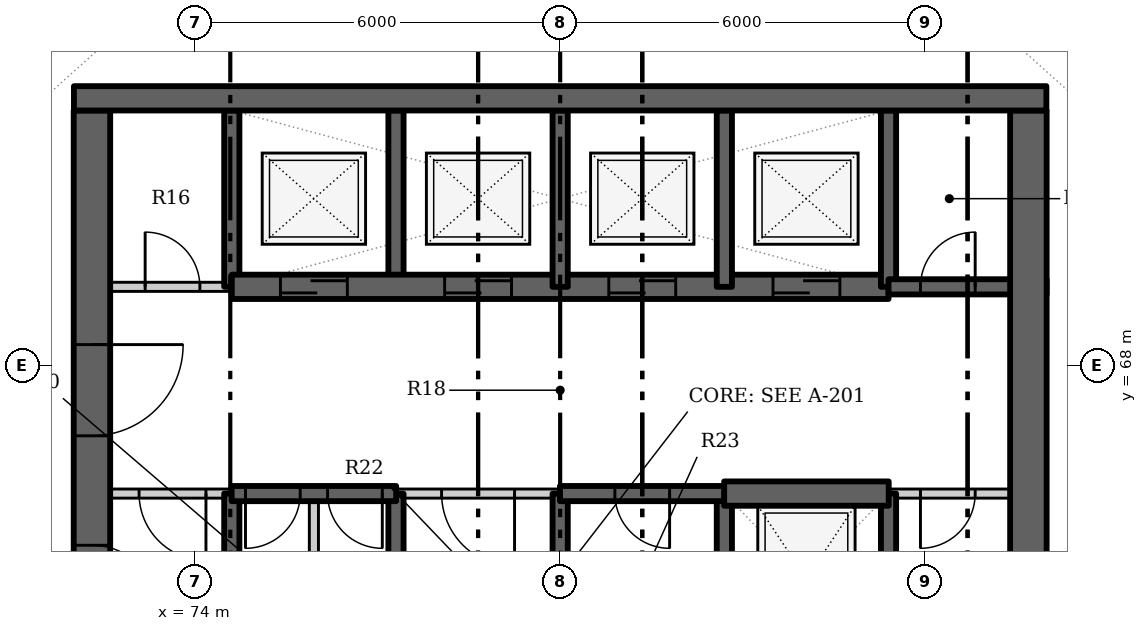
"""IFC4 building model, lengths in metres.
Left out: names, types, materials, properties, quantities, classifications, styles, units other than length and angle.
Written with IfcOpenShell. Run it as: python <this file> out.ifc"""

import sys

from ifc_helpers import new_model, si_unit, direction, frame, frame_2d, origin, place, context, subcontext, project, spatial, rectangle, extrude, element, fill, save


model = new_model("IFC4")
c1 = context("Model", 3, precision=1e-05, world=origin(), true_north=direction((0.0, 1.0)))
c2 = subcontext(c1, "Body", "Model", "MODEL_VIEW")
j1 = project(units=[si_unit("LENGTHUNIT", "METRE"), si_unit("PLANEANGLEUNIT", "RADIAN")], contexts=[c1])
p1 = place(None, origin())
s1 = spatial("IfcSite", under=j1, at=p1, CompositionType="ELEMENT")
p2 = place(p1, origin())
s2 = spatial("IfcBuilding", under=s1, at=p2, CompositionType="ELEMENT")
p3 = place(p2, origin())
s3 = spatial("IfcBuildingStorey", under=s2, at=p3, CompositionType="ELEMENT", Elevation=0.0)
p4 = place(p3, frame((74.6, 63.1, -1.8), z_axis=(0.0, 0.0, 1.0), x_axis=(0.0, 1.0, 0.0)))
e1 = element("IfcWall", 1, at=p4, inside=s3, PredefinedType="SHEAR", context=c2, shape_type="SweptSolid", body=[
    extrude(rectangle(XDim=2.8, YDim=0.25, at=frame_2d((1.4, 0.0))), origin(), (0.0, 0.0, 1.0), 8.1),
])
p5 = place(p3, frame((74.6, 69.3, -1.8), z_axis=(0.0, 0.0, 1.0), x_axis=(0.0, 1.0, 0.0)))
e2 = element("IfcWall", 2, at=p5, inside=s3, PredefinedType="SHEAR", context=c2, shape_type="SweptSolid", body=[
    extrude(rectangle(XDim=2.9, YDim=0.25, at=frame_2d((1.45, 0.0))), origin(), (0.0, 0.0, 1.0), 8.1),
])
p6 = place(p3, frame((72.0, 69.3, 0.0), z_axis=(0.0, 0.0, 1.0), x_axis=(1.0, 0.0, 0.0)))
e3 = element("IfcWall", 3, at=p6, inside=s3, PredefinedType="PARTITIONING", context=c2, shape_type="SweptSolid", body=[
    extrude(rectangle(XDim=2.6, YDim=0.15, at=frame_2d((1.3, 0.0))), origin(), (0.0, 0.0, 1.0), 6.3),
])
p7 = place(p6, frame((1.175, 0.0, 0.0)))
e4 = element("IfcOpeningElement", 4, at=p7, cuts=e3, PredefinedType="OPENING", context=c2, shape_type="SweptSolid", body=[
    extrude(rectangle(XDim=0.9, YDim=2.1, at=frame_2d((0.45, 1.05))), frame((0.0, 0.085, 0.0), z_axis=(0.0, -1.0, 0.0), x_axis=(1.0, 0.0, 0.0)), (0.0, 0.0, 1.0), 0.17),
])
p8 = place(p3, frame((72.3, 72.2, -1.8), z_axis=(0.0, 0.0, 1.0), x_axis=(0.0, -1.0, 0.0)))
e5 = element("IfcWall", 5, at=p8, inside=s3, PredefinedType="SHEAR", context=c2, shape_type="SweptSolid", body=[
    extrude(rectangle(XDim=9.1, YDim=0.6, at=frame_2d((4.55, 0.0))), origin(), (0.0, 0.0, 1.0), 8.1),
])
p9 = place(p8, frame((7.15, 0.0, 1.8)))
e6 = element("IfcOpeningElement", 6, at=p9, cuts=e5, PredefinedType="OPENING", context=c2, shape_type="SweptSolid", body=[
    extrude(rectangle(XDim=1.1, YDim=2.1, at=frame_2d((0.55, 1.05))), frame((0.0, 0.31, 0.0), z_axis=(0.0, -1.0, 0.0), x_axis=(1.0, 0.0, 0.0)), (0.0, 0.0, 1.0), 0.62),
])
p10 = place(p8, frame((3.85, 0.0, 1.8)))
e7 = element("IfcOpeningElement", 7, at=p10, cuts=e5, PredefinedType="OPENING", context=c2, shape_type="SweptSolid", body=[
    extrude(rectangle(XDim=1.5, YDim=2.1, at=frame_2d((0.75, 1.05))), frame((0.0, 0.31, 0.0), z_axis=(0.0, -1.0, 0.0), x_axis=(1.0, 0.0, 0.0)), (0.0, 0.0, 1.0), 0.62),
])
p11 = place(p3, frame((77.3, 63.1, -1.8), z_axis=(0.0, 0.0, 1.0), x_axis=(0.0, 1.0, 0.0)))
e8 = element("IfcWall", 8, at=p11, inside=s3, PredefinedType="SHEAR", context=c2, shape_type="SweptSolid", body=[
    extrude(rectangle(XDim=2.8, YDim=0.25, at=frame_2d((1.4, 0.0))), origin(), (0.0, 0.0, 1.0), 8.1),
])
p12 = place(p3, frame((77.3, 69.3, -1.8), z_axis=(0.0, 0.0, 1.0), x_axis=(0.0, 1.0, 0.0)))
e9 = element("IfcWall", 9, at=p12, inside=s3, PredefinedType="SHEAR", context=c2, shape_type="SweptSolid", body=[
    extrude(rectangle(XDim=2.9, YDim=0.25, at=frame_2d((1.45, 0.0))), origin(), (0.0, 0.0, 1.0), 8.1),
])
p13 = place(p3, frame((74.6, 69.3, -1.8), z_axis=(0.0, 0.0, 1.0), x_axis=(1.0, 0.0, 0.0)))
e10 = element("IfcWall", 10, at=p13, inside=s3, PredefinedType="SHEAR", context=c2, shape_type="SweptSolid", body=[
    extrude(rectangle(XDim=10.8, YDim=0.4, at=frame_2d((5.4, 0.0))), origin(), (0.0, 0.0, 1.0), 8.1),
])
p14 = place(p13, frame((0.8, 0.0, 1.8)))
e11 = element("IfcOpeningElement", 11, at=p14, cuts=e10, PredefinedType="OPENING", context=c2, shape_type="SweptSolid", body=[
    extrude(rectangle(XDim=1.1, YDim=2.1, at=frame_2d((0.55, 1.05))), frame((0.0, 0.21, 0.0), z_axis=(0.0, -1.0, 0.0), x_axis=(1.0, 0.0, 0.0)), (0.0, 0.0, 1.0), 0.42),
])
p15 = place(p13, frame((3.5, 0.0, 1.8)))
e12 = element("IfcOpeningElement", 12, at=p15, cuts=e10, PredefinedType="OPENING", context=c2, shape_type="SweptSolid", body=[
    extrude(rectangle(XDim=1.1, YDim=2.1, at=frame_2d((0.55, 1.05))), frame((0.0, 0.21, 0.0), z_axis=(0.0, -1.0, 0.0), x_axis=(1.0, 0.0, 0.0)), (0.0, 0.0, 1.0), 0.42),
])
p16 = place(p13, frame((6.2, 0.0, 1.8)))
e13 = element("IfcOpeningElement", 13, at=p16, cuts=e10, PredefinedType="OPENING", context=c2, shape_type="SweptSolid", body=[
    extrude(rectangle(XDim=1.1, YDim=2.1, at=frame_2d((0.55, 1.05))), frame((0.0, 0.21, 0.0), z_axis=(0.0, -1.0, 0.0), x_axis=(1.0, 0.0, 0.0)), (0.0, 0.0, 1.0), 0.42),
])
p17 = place(p13, frame((8.9, 0.0, 1.8)))
e14 = element("IfcOpeningElement", 14, at=p17, cuts=e10, PredefinedType="OPENING", context=c2, shape_type="SweptSolid", body=[
    extrude(rectangle(XDim=1.1, YDim=2.1, at=frame_2d((0.55, 1.05))), frame((0.0, 0.21, 0.0), z_axis=(0.0, -1.0, 0.0), x_axis=(1.0, 0.0, 0.0)), (0.0, 0.0, 1.0), 0.42),
])
p18 = place(p3, frame((80.0, 63.1, -1.8), z_axis=(0.0, 0.0, 1.0), x_axis=(0.0, 1.0, 0.0)))
e15 = element("IfcWall", 15, at=p18, inside=s3, PredefinedType="SHEAR", context=c2, shape_type="SweptSolid", body=[
    extrude(rectangle(XDim=2.8, YDim=0.25, at=frame_2d((1.4, 0.0))), origin(), (0.0, 0.0, 1.0), 8.1),
])
p19 = place(p3, frame((80.0, 69.3, -1.8), z_axis=(0.0, 0.0, 1.0), x_axis=(0.0, 1.0, 0.0)))
e16 = element("IfcWall", 16, at=p19, inside=s3, PredefinedType="SHEAR", context=c2, shape_type="SweptSolid", body=[
    extrude(rectangle(XDim=2.9, YDim=0.25, at=frame_2d((1.45, 0.0))), origin(), (0.0, 0.0, 1.0), 8.1),
])
p20 = place(p3, frame((82.7, 63.1, -1.8), z_axis=(0.0, 0.0, 1.0), x_axis=(0.0, 1.0, 0.0)))
e17 = element("IfcWall", 17, at=p20, inside=s3, PredefinedType="SHEAR", context=c2, shape_type="SweptSolid", body=[
    extrude(rectangle(XDim=2.8, YDim=0.25, at=frame_2d((1.4, 0.0))), origin(), (0.0, 0.0, 1.0), 8.1),
])
p21 = place(p3, frame((82.7, 69.3, -1.8), z_axis=(0.0, 0.0, 1.0), x_axis=(0.0, 1.0, 0.0)))
e18 = element("IfcWall", 18, at=p21, inside=s3, PredefinedType="SHEAR", context=c2, shape_type="SweptSolid", body=[
    extrude(rectangle(XDim=2.9, YDim=0.25, at=frame_2d((1.45, 0.0))), origin(), (0.0, 0.0, 1.0), 8.1),
])
p22 = place(p3, frame((85.4, 63.1, -1.8), z_axis=(0.0, 0.0, 1.0), x_axis=(0.0, 1.0, 0.0)))
e19 = element("IfcWall", 19, at=p22, inside=s3, PredefinedType="SHEAR", context=c2, shape_type="SweptSolid", body=[
    extrude(rectangle(XDim=2.8, YDim=0.25, at=frame_2d((1.4, 0.0))), origin(), (0.0, 0.0, 1.0), 8.1),
])
p23 = place(p3, frame((85.4, 69.3, -1.8), z_axis=(0.0, 0.0, 1.0), x_axis=(0.0, 1.0, 0.0)))
e20 = element("IfcWall", 20, at=p23, inside=s3, PredefinedType="SHEAR", context=c2, shape_type="SweptSolid", body=[
    extrude(rectangle(XDim=2.9, YDim=0.25, at=frame_2d((1.45, 0.0))), origin(), (0.0, 0.0, 1.0), 8.1),
])
p24 = place(p3, frame((85.4, 69.3, -1.8), z_axis=(0.0, 0.0, 1.0), x_axis=(1.0, 0.0, 0.0)))
e21 = element("IfcWall", 21, at=p24, inside=s3, PredefinedType="SHEAR", context=c2, shape_type="SweptSolid", body=[
    extrude(rectangle(XDim=2.6, YDim=0.25, at=frame_2d((1.3, 0.0))), origin(), (0.0, 0.0, 1.0), 8.1),
])
p25 = place(p24, frame((0.525, 0.0, 1.8)))
e22 = element("IfcOpeningElement", 22, at=p25, cuts=e21, PredefinedType="OPENING", context=c2, shape_type="SweptSolid", body=[
    extrude(rectangle(XDim=0.9, YDim=2.1, at=frame_2d((0.45, 1.05))), frame((0.0, 0.135, 0.0), z_axis=(0.0, -1.0, 0.0), x_axis=(1.0, 0.0, 0.0)), (0.0, 0.0, 1.0), 0.27),
])
p26 = place(p3, frame((87.7, 56.6, -1.8), z_axis=(0.0, 0.0, 1.0), x_axis=(0.0, 1.0, 0.0)))
e23 = element("IfcWall", 23, at=p26, inside=s3, PredefinedType="SHEAR", context=c2, shape_type="SweptSolid", body=[
    extrude(rectangle(XDim=15.6, YDim=0.6, at=frame_2d((7.8, 0.0))), origin(), (0.0, 0.0, 1.0), 8.1),
])
p27 = place(p26, frame((2.702, 0.0, 1.8)))
e24 = element("IfcOpeningElement", 24, at=p27, cuts=e23, PredefinedType="OPENING", context=c2, shape_type="SweptSolid", body=[
    extrude(rectangle(XDim=1.1, YDim=2.1, at=frame_2d((0.55, 1.05))), frame((0.0, 0.31, 0.0), z_axis=(0.0, -1.0, 0.0), x_axis=(1.0, 0.0, 0.0)), (0.0, 0.0, 1.0), 0.62),
])
p28 = place(p3, frame((74.603, 65.9, 0.0), z_axis=(0.0, 0.0, 1.0), x_axis=(-1.0, 0.0, 0.0)))
e25 = element("IfcWall", 25, at=p28, inside=s3, PredefinedType="PARTITIONING", context=c2, shape_type="SweptSolid", body=[
    extrude(rectangle(XDim=2.603, YDim=0.15, at=frame_2d((1.302, 0.0))), origin(), (0.0, 0.0, 1.0), 6.3),
])
p29 = place(p28, frame((0.428, 0.0, 0.0)))
e26 = element("IfcOpeningElement", 26, at=p29, cuts=e25, PredefinedType="OPENING", context=c2, shape_type="SweptSolid", body=[
    extrude(rectangle(XDim=1.1, YDim=2.1, at=frame_2d((0.55, 1.05))), frame((0.0, 0.085, 0.0), z_axis=(0.0, -1.0, 0.0), x_axis=(1.0, 0.0, 0.0)), (0.0, 0.0, 1.0), 0.17),
])
p30 = place(p3, frame((80.003, 65.9, 0.0), z_axis=(0.0, 0.0, 1.0), x_axis=(-1.0, 0.0, 0.0)))
e27 = element("IfcWall", 27, at=p30, inside=s3, PredefinedType="PARTITIONING", context=c2, shape_type="SweptSolid", body=[
    extrude(rectangle(XDim=2.706, YDim=0.15, at=frame_2d((1.353, 0.0))), origin(), (0.0, 0.0, 1.0), 6.3),
])
p31 = place(p30, frame((0.753, 0.0, 0.0)))
e28 = element("IfcOpeningElement", 28, at=p31, cuts=e27, PredefinedType="OPENING", context=c2, shape_type="SweptSolid", body=[
    extrude(rectangle(XDim=1.2, YDim=2.1, at=frame_2d((0.6, 1.05))), frame((0.0, 0.085, 0.0), z_axis=(0.0, -1.0, 0.0), x_axis=(1.0, 0.0, 0.0)), (0.0, 0.0, 1.0), 0.17),
])
p32 = place(p3, frame((88.0, 65.9, 0.0), z_axis=(0.0, 0.0, 1.0), x_axis=(-1.0, 0.0, 0.0)))
e29 = element("IfcWall", 29, at=p32, inside=s3, PredefinedType="PARTITIONING", context=c2, shape_type="SweptSolid", body=[
    extrude(rectangle(XDim=2.603, YDim=0.15, at=frame_2d((1.302, 0.0))), origin(), (0.0, 0.0, 1.0), 6.3),
])
p33 = place(p32, frame((1.175, 0.0, 0.0)))
e30 = element("IfcOpeningElement", 30, at=p33, cuts=e29, PredefinedType="OPENING", context=c2, shape_type="SweptSolid", body=[
    extrude(rectangle(XDim=0.9, YDim=2.1, at=frame_2d((0.45, 1.05))), frame((0.0, 0.085, 0.0), z_axis=(0.0, -1.0, 0.0), x_axis=(1.0, 0.0, 0.0)), (0.0, 0.0, 1.0), 0.17),
])
p34 = place(p3, frame((77.303, 65.9, -1.8), z_axis=(0.0, 0.0, 1.0), x_axis=(-1.0, 0.0, 0.0)))
e31 = element("IfcWall", 31, at=p34, inside=s3, PredefinedType="SHEAR", context=c2, shape_type="SweptSolid", body=[
    extrude(rectangle(XDim=2.706, YDim=0.25, at=frame_2d((1.353, 0.0))), origin(), (0.0, 0.0, 1.0), 8.1),
])
p35 = place(p34, frame((1.578, 0.0, 1.8)))
e32 = element("IfcOpeningElement", 32, at=p35, cuts=e31, PredefinedType="OPENING", context=c2, shape_type="SweptSolid", body=[
    extrude(rectangle(XDim=0.9, YDim=2.1, at=frame_2d((0.45, 1.05))), frame((0.0, 0.135, 0.0), z_axis=(0.0, -1.0, 0.0), x_axis=(1.0, 0.0, 0.0)), (0.0, 0.0, 1.0), 0.27),
])
p36 = place(p34, frame((0.228, 0.0, 1.8)))
e33 = element("IfcOpeningElement", 33, at=p36, cuts=e31, PredefinedType="OPENING", context=c2, shape_type="SweptSolid", body=[
    extrude(rectangle(XDim=0.9, YDim=2.1, at=frame_2d((0.45, 1.05))), frame((0.0, 0.135, 0.0), z_axis=(0.0, -1.0, 0.0), x_axis=(1.0, 0.0, 0.0)), (0.0, 0.0, 1.0), 0.27),
])
p37 = place(p3, frame((82.703, 65.9, -1.8), z_axis=(0.0, 0.0, 1.0), x_axis=(-1.0, 0.0, 0.0)))
e34 = element("IfcWall", 34, at=p37, inside=s3, PredefinedType="SHEAR", context=c2, shape_type="SweptSolid", body=[
    extrude(rectangle(XDim=2.706, YDim=0.25, at=frame_2d((1.353, 0.0))), origin(), (0.0, 0.0, 1.0), 8.1),
])
p38 = place(p37, frame((0.903, 0.0, 1.8)))
e35 = element("IfcOpeningElement", 35, at=p38, cuts=e34, PredefinedType="OPENING", context=c2, shape_type="SweptSolid", body=[
    extrude(rectangle(XDim=0.9, YDim=2.1, at=frame_2d((0.45, 1.05))), frame((0.0, 0.135, 0.0), z_axis=(0.0, -1.0, 0.0), x_axis=(1.0, 0.0, 0.0)), (0.0, 0.0, 1.0), 0.27),
])
p39 = place(p3, frame((82.697, 65.9, -1.8), z_axis=(0.0, 0.0, 1.0), x_axis=(1.0, 0.0, 0.0)))
e36 = element("IfcWall", 36, at=p39, inside=s3, PredefinedType="SHEAR", context=c2, shape_type="SweptSolid", body=[
    extrude(rectangle(XDim=2.706, YDim=0.4, at=frame_2d((1.353, 0.0))), origin(), (0.0, 0.0, 1.0), 8.1),
])
p40 = place(p3, frame((75.95, 63.1, 0.0), z_axis=(0.0, 0.0, 1.0), x_axis=(0.0, 1.0, 0.0)))
e37 = element("IfcWall", 37, at=p40, inside=s3, PredefinedType="PARTITIONING", context=c2, shape_type="SweptSolid", body=[
    extrude(rectangle(XDim=2.8, YDim=0.15, at=frame_2d((1.4, 0.0))), origin(), (0.0, 0.0, 1.0), 6.3),
])
p41 = place(p3, frame((72.004, 72.4, -1.8), z_axis=(0.0, 0.0, 1.0), x_axis=(1.0, 0.0, 0.0)))
e38 = element("IfcWall", 38, at=p41, inside=s3, PredefinedType="SHEAR", context=c2, shape_type="SweptSolid", body=[
    extrude(rectangle(XDim=15.992, YDim=0.4, at=frame_2d((7.996, 0.0))), origin(), (0.0, 0.0, 1.0), 8.1),
])
p42 = place(p7, origin())
e39 = element("IfcDoor", 39, at=p42, inside=s3, OperationType="SINGLE_SWING_LEFT", PredefinedType="DOOR", context=c2, shape_type="SweptSolid", body=[
    extrude(rectangle(XDim=0.9, YDim=2.1, at=frame_2d((0.45, 1.05))), frame((0.0, 0.025, 0.0), z_axis=(0.0, -1.0, 0.0), x_axis=(1.0, 0.0, 0.0)), (0.0, 0.0, 1.0), 0.05),
])
fill(e4, e39)
p43 = place(p14, origin())
e40 = element("IfcDoor", 40, at=p43, inside=s3, OperationType="SLIDING_TO_LEFT", PredefinedType="DOOR", context=c2, shape_type="SweptSolid", body=[
    extrude(rectangle(XDim=1.1, YDim=2.1, at=frame_2d((0.55, 1.05))), frame((0.0, 0.025, 0.0), z_axis=(0.0, -1.0, 0.0), x_axis=(1.0, 0.0, 0.0)), (0.0, 0.0, 1.0), 0.05),
])
fill(e11, e40)
p44 = place(p15, origin())
e41 = element("IfcDoor", 41, at=p44, inside=s3, OperationType="SLIDING_TO_LEFT", PredefinedType="DOOR", context=c2, shape_type="SweptSolid", body=[
    extrude(rectangle(XDim=1.1, YDim=2.1, at=frame_2d((0.55, 1.05))), frame((0.0, 0.025, 0.0), z_axis=(0.0, -1.0, 0.0), x_axis=(1.0, 0.0, 0.0)), (0.0, 0.0, 1.0), 0.05),
])
fill(e12, e41)
p45 = place(p16, origin())
e42 = element("IfcDoor", 42, at=p45, inside=s3, OperationType="SLIDING_TO_LEFT", PredefinedType="DOOR", context=c2, shape_type="SweptSolid", body=[
    extrude(rectangle(XDim=1.1, YDim=2.1, at=frame_2d((0.55, 1.05))), frame((0.0, 0.025, 0.0), z_axis=(0.0, -1.0, 0.0), x_axis=(1.0, 0.0, 0.0)), (0.0, 0.0, 1.0), 0.05),
])
fill(e13, e42)
p46 = place(p17, origin())
e43 = element("IfcDoor", 43, at=p46, inside=s3, OperationType="SLIDING_TO_LEFT", PredefinedType="DOOR", context=c2, shape_type="SweptSolid", body=[
    extrude(rectangle(XDim=1.1, YDim=2.1, at=frame_2d((0.55, 1.05))), frame((0.0, 0.025, 0.0), z_axis=(0.0, -1.0, 0.0), x_axis=(1.0, 0.0, 0.0)), (0.0, 0.0, 1.0), 0.05),
])
fill(e14, e43)
p47 = place(p25, origin())
e44 = element("IfcDoor", 44, at=p47, inside=s3, OperationType="SINGLE_SWING_RIGHT", PredefinedType="DOOR", context=c2, shape_type="SweptSolid", body=[
    extrude(rectangle(XDim=0.9, YDim=2.1, at=frame_2d((0.45, 1.05))), frame((0.0, 0.025, 0.0), z_axis=(0.0, -1.0, 0.0), x_axis=(1.0, 0.0, 0.0)), (0.0, 0.0, 1.0), 0.05),
])
fill(e22, e44)
p48 = place(p29, origin())
e45 = element("IfcDoor", 45, at=p48, inside=s3, OperationType="SINGLE_SWING_LEFT", PredefinedType="DOOR", context=c2, shape_type="SweptSolid", body=[
    extrude(rectangle(XDim=1.1, YDim=2.1, at=frame_2d((0.55, 1.05))), frame((0.0, 0.025, 0.0), z_axis=(0.0, -1.0, 0.0), x_axis=(1.0, 0.0, 0.0)), (0.0, 0.0, 1.0), 0.05),
])
fill(e26, e45)
p49 = place(p35, origin())
e46 = element("IfcDoor", 46, at=p49, inside=s3, OperationType="SINGLE_SWING_RIGHT", PredefinedType="DOOR", context=c2, shape_type="SweptSolid", body=[
    extrude(rectangle(XDim=0.9, YDim=2.1, at=frame_2d((0.45, 1.05))), frame((0.0, 0.025, 0.0), z_axis=(0.0, -1.0, 0.0), x_axis=(1.0, 0.0, 0.0)), (0.0, 0.0, 1.0), 0.05),
])
fill(e32, e46)
p50 = place(p36, origin())
e47 = element("IfcDoor", 47, at=p50, inside=s3, OperationType="SINGLE_SWING_LEFT", PredefinedType="DOOR", context=c2, shape_type="SweptSolid", body=[
    extrude(rectangle(XDim=0.9, YDim=2.1, at=frame_2d((0.45, 1.05))), frame((0.0, 0.025, 0.0), z_axis=(0.0, -1.0, 0.0), x_axis=(1.0, 0.0, 0.0)), (0.0, 0.0, 1.0), 0.05),
])
fill(e33, e47)
p51 = place(p31, origin())
e48 = element("IfcDoor", 48, at=p51, inside=s3, OperationType="DOUBLE_DOOR_SINGLE_SWING", PredefinedType="DOOR", context=c2, shape_type="SweptSolid", body=[
    extrude(rectangle(XDim=1.2, YDim=2.1, at=frame_2d((0.6, 1.05))), frame((0.0, 0.025, 0.0), z_axis=(0.0, -1.0, 0.0), x_axis=(1.0, 0.0, 0.0)), (0.0, 0.0, 1.0), 0.05),
])
fill(e28, e48)
p52 = place(p38, origin())
e49 = element("IfcDoor", 49, at=p52, inside=s3, OperationType="SINGLE_SWING_LEFT", PredefinedType="DOOR", context=c2, shape_type="SweptSolid", body=[
    extrude(rectangle(XDim=0.9, YDim=2.1, at=frame_2d((0.45, 1.05))), frame((0.0, 0.025, 0.0), z_axis=(0.0, -1.0, 0.0), x_axis=(1.0, 0.0, 0.0)), (0.0, 0.0, 1.0), 0.05),
])
fill(e35, e49)
p53 = place(p33, origin())
e50 = element("IfcDoor", 50, at=p53, inside=s3, OperationType="SINGLE_SWING_RIGHT", PredefinedType="DOOR", context=c2, shape_type="SweptSolid", body=[
    extrude(rectangle(XDim=0.9, YDim=2.1, at=frame_2d((0.45, 1.05))), frame((0.0, 0.025, 0.0), z_axis=(0.0, -1.0, 0.0), x_axis=(1.0, 0.0, 0.0)), (0.0, 0.0, 1.0), 0.05),
])
fill(e30, e50)
p54 = place(p9, origin())
e51 = element("IfcDoor", 51, at=p54, inside=s3, OperationType="SINGLE_SWING_RIGHT", PredefinedType="DOOR", context=c2, shape_type="SweptSolid", body=[
    extrude(rectangle(XDim=1.1, YDim=2.1, at=frame_2d((0.55, 1.05))), frame((0.0, 0.025, 0.0), z_axis=(0.0, -1.0, 0.0), x_axis=(1.0, 0.0, 0.0)), (0.0, 0.0, 1.0), 0.05),
])
fill(e6, e51)
p55 = place(p10, origin())
e52 = element("IfcDoor", 52, at=p55, inside=s3, OperationType="DOUBLE_DOOR_SINGLE_SWING", PredefinedType="DOOR", context=c2, shape_type="SweptSolid", body=[
    extrude(rectangle(XDim=1.5, YDim=2.1, at=frame_2d((0.75, 1.05))), frame((0.0, 0.025, 0.0), z_axis=(0.0, -1.0, 0.0), x_axis=(1.0, 0.0, 0.0)), (0.0, 0.0, 1.0), 0.05),
])
fill(e7, e52)
save(model, sys.argv[1])
